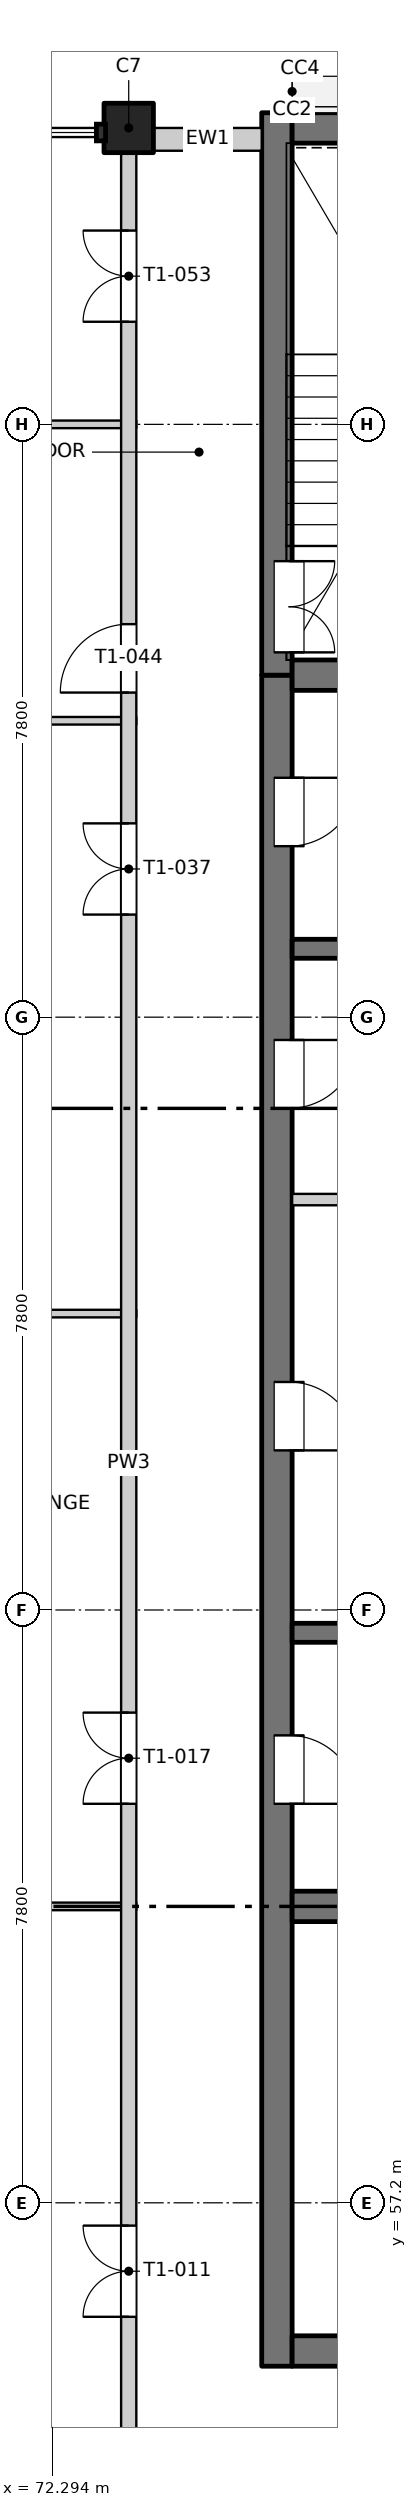
"""IFC4 building model, lengths in metres.
Left out: names, types, materials, properties, quantities, classifications, styles, units other than length and angle.
Written with IfcOpenShell. Run it as: python <this file> out.ifc"""

import sys

from ifc_helpers import new_model, si_unit, direction, frame, frame_2d, origin, origin_2d, place, context, subcontext, project, spatial, rectangle, extrude, element, fill, save


model = new_model("IFC4")
c1 = context("Model", 3, precision=1e-05, world=origin(), true_north=direction((0.0, 1.0)))
c2 = subcontext(c1, "Body", "Model", "MODEL_VIEW")
j1 = project(units=[si_unit("LENGTHUNIT", "METRE"), si_unit("PLANEANGLEUNIT", "RADIAN")], contexts=[c1])
p1 = place(None, origin())
s1 = spatial("IfcSite", under=j1, at=p1, CompositionType="ELEMENT")
p2 = place(p1, origin())
s2 = spatial("IfcBuilding", under=s1, at=p2, CompositionType="ELEMENT")
p3 = place(p2, frame((0.0, 0.0, 263.0)))
s3 = spatial("IfcBuildingStorey", under=s2, at=p3, CompositionType="ELEMENT", Elevation=263.0)
p4 = place(p3, frame((73.3, 84.5, -0.25), z_axis=(0.0, 0.0, 1.0), x_axis=(1.0, 0.0, 0.0)))
e1 = element("IfcColumn", 1, at=p4, inside=s3, PredefinedType="COLUMN", context=c2, shape_type="SweptSolid", body=[
    extrude(rectangle(XDim=0.65, YDim=0.65, at=origin_2d()), origin(), (0.0, 0.0, 1.0), 3.35),
])
p5 = place(p3, frame((75.25, 55.05, -0.25), z_axis=(0.0, 0.0, 1.0), x_axis=(0.0, 1.0, 0.0)))
e2 = element("IfcWall", 2, at=p5, inside=s3, PredefinedType="SOLIDWALL", context=c2, shape_type="SweptSolid", body=[
    extrude(rectangle(XDim=22.25, YDim=0.4, at=frame_2d((11.125, 0.0))), origin(), (0.0, 0.0, 1.0), 3.35),
])
p6 = place(p5, frame((7.4, 0.0, 0.25)))
e3 = element("IfcOpeningElement", 3, at=p6, cuts=e2, PredefinedType="OPENING", context=c2, shape_type="SweptSolid", body=[
    extrude(rectangle(XDim=0.9, YDim=2.1, at=frame_2d((0.45, 1.05))), frame((0.0, 0.21, 0.0), z_axis=(0.0, -1.0, 0.0), x_axis=(1.0, 0.0, 0.0)), (0.0, 0.0, 1.0), 0.42),
])
p7 = place(p5, frame((12.05, 0.0, 0.25)))
e4 = element("IfcOpeningElement", 4, at=p7, cuts=e2, PredefinedType="OPENING", context=c2, shape_type="SweptSolid", body=[
    extrude(rectangle(XDim=0.9, YDim=2.1, at=frame_2d((0.45, 1.05))), frame((0.0, 0.21, 0.0), z_axis=(0.0, -1.0, 0.0), x_axis=(1.0, 0.0, 0.0)), (0.0, 0.0, 1.0), 0.42),
])
p8 = place(p5, frame((16.55, 0.0, 0.25)))
e5 = element("IfcOpeningElement", 5, at=p8, cuts=e2, PredefinedType="OPENING", context=c2, shape_type="SweptSolid", body=[
    extrude(rectangle(XDim=0.9, YDim=2.1, at=frame_2d((0.45, 1.05))), frame((0.0, 0.21, 0.0), z_axis=(0.0, -1.0, 0.0), x_axis=(1.0, 0.0, 0.0)), (0.0, 0.0, 1.0), 0.42),
])
p9 = place(p5, frame((20.0, 0.0, 0.25)))
e6 = element("IfcOpeningElement", 6, at=p9, cuts=e2, PredefinedType="OPENING", context=c2, shape_type="SweptSolid", body=[
    extrude(rectangle(XDim=0.9, YDim=2.1, at=frame_2d((0.45, 1.05))), frame((0.0, 0.21, 0.0), z_axis=(0.0, -1.0, 0.0), x_axis=(1.0, 0.0, 0.0)), (0.0, 0.0, 1.0), 0.42),
])
p10 = place(p3, frame((75.25, 77.3, -0.25), z_axis=(0.0, 0.0, 1.0), x_axis=(0.0, 1.0, 0.0)))
e7 = element("IfcWall", 7, at=p10, inside=s3, PredefinedType="SOLIDWALL", context=c2, shape_type="SweptSolid", body=[
    extrude(rectangle(XDim=7.4, YDim=0.4, at=frame_2d((3.7, 0.0))), origin(), (0.0, 0.0, 1.0), 3.35),
])
p11 = place(p10, frame((0.3, 0.0, 0.25)))
e8 = element("IfcOpeningElement", 8, at=p11, cuts=e7, PredefinedType="OPENING", context=c2, shape_type="SweptSolid", body=[
    extrude(rectangle(XDim=1.2, YDim=2.1, at=frame_2d((0.6, 1.05))), frame((0.0, 0.21, 0.0), z_axis=(0.0, -1.0, 0.0), x_axis=(1.0, 0.0, 0.0)), (0.0, 0.0, 1.0), 0.42),
])
p12 = place(p3, frame((75.45, 55.25, -0.25), z_axis=(0.0, 0.0, 1.0), x_axis=(1.0, 0.0, 0.0)))
e9 = element("IfcWall", 9, at=p12, inside=s3, PredefinedType="SOLIDWALL", context=c2, shape_type="SweptSolid", body=[
    extrude(rectangle(XDim=19.1, YDim=0.4, at=frame_2d((9.55, 0.0))), origin(), (0.0, 0.0, 1.0), 3.35),
])
p13 = place(p12, frame((8.8, 0.0, 0.25)))
e10 = element("IfcOpeningElement", 10, at=p13, cuts=e9, PredefinedType="OPENING", context=c2, shape_type="SweptSolid", body=[
    extrude(rectangle(XDim=1.5, YDim=2.1, at=frame_2d((0.75, 1.05))), frame((0.0, 0.21, 0.0), z_axis=(0.0, -1.0, 0.0), x_axis=(1.0, 0.0, 0.0)), (0.0, 0.0, 1.0), 0.42),
])
p14 = place(p3, frame((75.45, 84.5, -0.25), z_axis=(0.0, 0.0, 1.0), x_axis=(1.0, 0.0, 0.0)))
e11 = element("IfcWall", 11, at=p14, inside=s3, PredefinedType="SOLIDWALL", context=c2, shape_type="SweptSolid", body=[
    extrude(rectangle(XDim=19.1, YDim=0.4, at=frame_2d((9.55, 0.0))), origin(), (0.0, 0.0, 1.0), 3.35),
])
p15 = place(p3, frame((75.45, 61.1, -0.25), z_axis=(0.0, 0.0, 1.0), x_axis=(1.0, 0.0, 0.0)))
e12 = element("IfcWall", 12, at=p15, inside=s3, PredefinedType="SOLIDWALL", context=c2, shape_type="SweptSolid", body=[
    extrude(rectangle(XDim=3.875, YDim=0.4, at=frame_2d((1.938, 0.0))), origin(), (0.0, 0.0, 1.0), 3.35),
])
for number, where, z_axis, x_axis in (
    (13, (75.45, 64.7, -0.25), (0.0, 0.0, 1.0), (1.0, 0.0, 0.0)),
    (14, (75.45, 73.7, -0.25), (0.0, 0.0, 1.0), (1.0, 0.0, 0.0)),
):
    element("IfcWall", number, at=place(p3, frame(where, z_axis=z_axis, x_axis=x_axis)), inside=s3, PredefinedType="SOLIDWALL", context=c2, shape_type="SweptSolid", body=[
        extrude(rectangle(XDim=3.875, YDim=0.25, at=frame_2d((1.938, 0.0))), origin(), (0.0, 0.0, 1.0), 3.35),
    ])
p16 = place(p3, frame((75.45, 77.3, -0.25), z_axis=(0.0, 0.0, 1.0), x_axis=(1.0, 0.0, 0.0)))
e15 = element("IfcWall", 15, at=p16, inside=s3, PredefinedType="SOLIDWALL", context=c2, shape_type="SweptSolid", body=[
    extrude(rectangle(XDim=3.875, YDim=0.4, at=frame_2d((1.938, 0.0))), origin(), (0.0, 0.0, 1.0), 3.35),
])
p17 = place(p3, frame((73.625, 84.35, 0.0), z_axis=(0.0, 0.0, 1.0), x_axis=(1.0, 0.0, 0.0)))
e16 = element("IfcWall", 16, at=p17, inside=s3, PredefinedType="SOLIDWALL", context=c2, shape_type="SweptSolid", body=[
    extrude(rectangle(XDim=1.425, YDim=0.3, at=frame_2d((0.712, 0.0))), origin(), (0.0, 0.0, 1.0), 3.1),
])
for number, where, z_axis, x_axis in (
    (17, (65.635, 61.1, 0.0), (0.0, 0.0, 1.0), (1.0, 0.0, 0.0)),
    (18, (65.635, 68.9, 0.0), (0.0, 0.0, 1.0), (1.0, 0.0, 0.0)),
):
    element("IfcWall", number, at=place(p3, frame(where, z_axis=z_axis, x_axis=x_axis)), inside=s3, PredefinedType="PARTITIONING", context=c2, shape_type="SweptSolid", body=[
        extrude(rectangle(XDim=7.765, YDim=0.1, at=frame_2d((3.883, 0.0))), origin(), (0.0, 0.0, 1.0), 3.1),
    ])
p18 = place(p3, frame((75.45, 70.4, 0.0), z_axis=(0.0, 0.0, 1.0), x_axis=(1.0, 0.0, 0.0)))
e19 = element("IfcWall", 19, at=p18, inside=s3, PredefinedType="PARTITIONING", context=c2, shape_type="SweptSolid", body=[
    extrude(rectangle(XDim=3.875, YDim=0.15, at=frame_2d((1.938, 0.0))), origin(), (0.0, 0.0, 1.0), 3.1),
])
p19 = place(p3, frame((65.635, 76.7, 0.0), z_axis=(0.0, 0.0, 1.0), x_axis=(1.0, 0.0, 0.0)))
e20 = element("IfcWall", 20, at=p19, inside=s3, PredefinedType="PARTITIONING", context=c2, shape_type="SweptSolid", body=[
    extrude(rectangle(XDim=7.765, YDim=0.1, at=frame_2d((3.883, 0.0))), origin(), (0.0, 0.0, 1.0), 3.1),
])
p20 = place(p3, frame((67.25, 80.6, 0.0), z_axis=(0.0, 0.0, 1.0), x_axis=(1.0, 0.0, 0.0)))
e21 = element("IfcWall", 21, at=p20, inside=s3, PredefinedType="PARTITIONING", context=c2, shape_type="SweptSolid", body=[
    extrude(rectangle(XDim=6.15, YDim=0.1, at=frame_2d((3.075, 0.0))), origin(), (0.0, 0.0, 1.0), 3.1),
])
p21 = place(p3, frame((73.3, 49.5, 0.0), z_axis=(0.0, 0.0, 1.0), x_axis=(0.0, 1.0, 0.0)))
e22 = element("IfcWall", 22, at=p21, inside=s3, PredefinedType="PARTITIONING", context=c2, shape_type="SweptSolid", body=[
    extrude(rectangle(XDim=34.865, YDim=0.2, at=frame_2d((17.433, 0.0))), origin(), (0.0, 0.0, 1.0), 3.1),
])
p22 = place(p21, frame((6.2, 0.0, 0.0)))
e23 = element("IfcOpeningElement", 23, at=p22, cuts=e22, PredefinedType="OPENING", context=c2, shape_type="SweptSolid", body=[
    extrude(rectangle(XDim=1.2, YDim=2.1, at=frame_2d((0.6, 1.05))), frame((0.0, 0.11, 0.0), z_axis=(0.0, -1.0, 0.0), x_axis=(1.0, 0.0, 0.0)), (0.0, 0.0, 1.0), 0.22),
])
p23 = place(p21, frame((12.95, 0.0, 0.0)))
e24 = element("IfcOpeningElement", 24, at=p23, cuts=e22, PredefinedType="OPENING", context=c2, shape_type="SweptSolid", body=[
    extrude(rectangle(XDim=1.2, YDim=2.1, at=frame_2d((0.6, 1.05))), frame((0.0, 0.11, 0.0), z_axis=(0.0, -1.0, 0.0), x_axis=(1.0, 0.0, 0.0)), (0.0, 0.0, 1.0), 0.22),
])
p24 = place(p21, frame((24.65, 0.0, 0.0)))
e25 = element("IfcOpeningElement", 25, at=p24, cuts=e22, PredefinedType="OPENING", context=c2, shape_type="SweptSolid", body=[
    extrude(rectangle(XDim=1.2, YDim=2.1, at=frame_2d((0.6, 1.05))), frame((0.0, 0.11, 0.0), z_axis=(0.0, -1.0, 0.0), x_axis=(1.0, 0.0, 0.0)), (0.0, 0.0, 1.0), 0.22),
])
p25 = place(p21, frame((27.571, 0.0, 0.0)))
e26 = element("IfcOpeningElement", 26, at=p25, cuts=e22, PredefinedType="OPENING", context=c2, shape_type="SweptSolid", body=[
    extrude(rectangle(XDim=0.9, YDim=2.1, at=frame_2d((0.45, 1.05))), frame((0.0, 0.11, 0.0), z_axis=(0.0, -1.0, 0.0), x_axis=(1.0, 0.0, 0.0)), (0.0, 0.0, 1.0), 0.22),
])
p26 = place(p21, frame((32.45, 0.0, 0.0)))
e27 = element("IfcOpeningElement", 27, at=p26, cuts=e22, PredefinedType="OPENING", context=c2, shape_type="SweptSolid", body=[
    extrude(rectangle(XDim=1.2, YDim=2.1, at=frame_2d((0.6, 1.05))), frame((0.0, 0.11, 0.0), z_axis=(0.0, -1.0, 0.0), x_axis=(1.0, 0.0, 0.0)), (0.0, 0.0, 1.0), 0.22),
])
p27 = place(p22, origin())
e28 = element("IfcDoor", 28, at=p27, inside=s3, OperationType="DOUBLE_DOOR_SINGLE_SWING", PredefinedType="DOOR", context=c2, shape_type="SweptSolid", body=[
    extrude(rectangle(XDim=1.2, YDim=2.1, at=frame_2d((0.6, 1.05))), frame((0.0, 0.025, 0.0), z_axis=(0.0, -1.0, 0.0), x_axis=(1.0, 0.0, 0.0)), (0.0, 0.0, 1.0), 0.05),
])
fill(e23, e28)
p28 = place(p6, origin())
e29 = element("IfcDoor", 29, at=p28, inside=s3, OperationType="SINGLE_SWING_RIGHT", PredefinedType="DOOR", context=c2, shape_type="SweptSolid", body=[
    extrude(rectangle(XDim=0.9, YDim=2.1, at=frame_2d((0.45, 1.05))), frame((0.0, -0.135, 0.0), z_axis=(0.0, -1.0, 0.0), x_axis=(1.0, 0.0, 0.0)), (0.0, 0.0, 1.0), 0.05),
])
fill(e3, e29)
p29 = place(p23, origin())
e30 = element("IfcDoor", 30, at=p29, inside=s3, OperationType="DOUBLE_DOOR_SINGLE_SWING", PredefinedType="DOOR", context=c2, shape_type="SweptSolid", body=[
    extrude(rectangle(XDim=1.2, YDim=2.1, at=frame_2d((0.6, 1.05))), frame((0.0, 0.025, 0.0), z_axis=(0.0, -1.0, 0.0), x_axis=(1.0, 0.0, 0.0)), (0.0, 0.0, 1.0), 0.05),
])
fill(e24, e30)
p30 = place(p7, origin())
e31 = element("IfcDoor", 31, at=p30, inside=s3, OperationType="SINGLE_SWING_RIGHT", PredefinedType="DOOR", context=c2, shape_type="SweptSolid", body=[
    extrude(rectangle(XDim=0.9, YDim=2.1, at=frame_2d((0.45, 1.05))), frame((0.0, -0.135, 0.0), z_axis=(0.0, -1.0, 0.0), x_axis=(1.0, 0.0, 0.0)), (0.0, 0.0, 1.0), 0.05),
])
fill(e4, e31)
p31 = place(p8, origin())
e32 = element("IfcDoor", 32, at=p31, inside=s3, OperationType="SINGLE_SWING_LEFT", PredefinedType="DOOR", context=c2, shape_type="SweptSolid", body=[
    extrude(rectangle(XDim=0.9, YDim=2.1, at=frame_2d((0.45, 1.05))), frame((0.0, -0.135, 0.0), z_axis=(0.0, -1.0, 0.0), x_axis=(1.0, 0.0, 0.0)), (0.0, 0.0, 1.0), 0.05),
])
fill(e5, e32)
p32 = place(p24, origin())
e33 = element("IfcDoor", 33, at=p32, inside=s3, OperationType="DOUBLE_DOOR_SINGLE_SWING", PredefinedType="DOOR", context=c2, shape_type="SweptSolid", body=[
    extrude(rectangle(XDim=1.2, YDim=2.1, at=frame_2d((0.6, 1.05))), frame((0.0, 0.025, 0.0), z_axis=(0.0, -1.0, 0.0), x_axis=(1.0, 0.0, 0.0)), (0.0, 0.0, 1.0), 0.05),
])
fill(e25, e33)
p33 = place(p9, origin())
e34 = element("IfcDoor", 34, at=p33, inside=s3, OperationType="SINGLE_SWING_LEFT", PredefinedType="DOOR", context=c2, shape_type="SweptSolid", body=[
    extrude(rectangle(XDim=0.9, YDim=2.1, at=frame_2d((0.45, 1.05))), frame((0.0, -0.135, 0.0), z_axis=(0.0, -1.0, 0.0), x_axis=(1.0, 0.0, 0.0)), (0.0, 0.0, 1.0), 0.05),
])
fill(e6, e34)
p34 = place(p25, origin())
e35 = element("IfcDoor", 35, at=p34, inside=s3, OperationType="SINGLE_SWING_LEFT", PredefinedType="DOOR", context=c2, shape_type="SweptSolid", body=[
    extrude(rectangle(XDim=0.9, YDim=2.1, at=frame_2d((0.45, 1.05))), frame((0.0, 0.025, 0.0), z_axis=(0.0, -1.0, 0.0), x_axis=(1.0, 0.0, 0.0)), (0.0, 0.0, 1.0), 0.05),
])
fill(e26, e35)
p35 = place(p11, origin())
e36 = element("IfcDoor", 36, at=p35, inside=s3, OperationType="DOUBLE_DOOR_SINGLE_SWING", PredefinedType="DOOR", context=c2, shape_type="SweptSolid", body=[
    extrude(rectangle(XDim=1.2, YDim=2.1, at=frame_2d((0.6, 1.05))), frame((0.0, -0.135, 0.0), z_axis=(0.0, -1.0, 0.0), x_axis=(1.0, 0.0, 0.0)), (0.0, 0.0, 1.0), 0.05),
])
fill(e8, e36)
p36 = place(p26, origin())
e37 = element("IfcDoor", 37, at=p36, inside=s3, OperationType="DOUBLE_DOOR_SINGLE_SWING", PredefinedType="DOOR", context=c2, shape_type="SweptSolid", body=[
    extrude(rectangle(XDim=1.2, YDim=2.1, at=frame_2d((0.6, 1.05))), frame((0.0, 0.025, 0.0), z_axis=(0.0, -1.0, 0.0), x_axis=(1.0, 0.0, 0.0)), (0.0, 0.0, 1.0), 0.05),
])
fill(e27, e37)
save(model, sys.argv[1])
